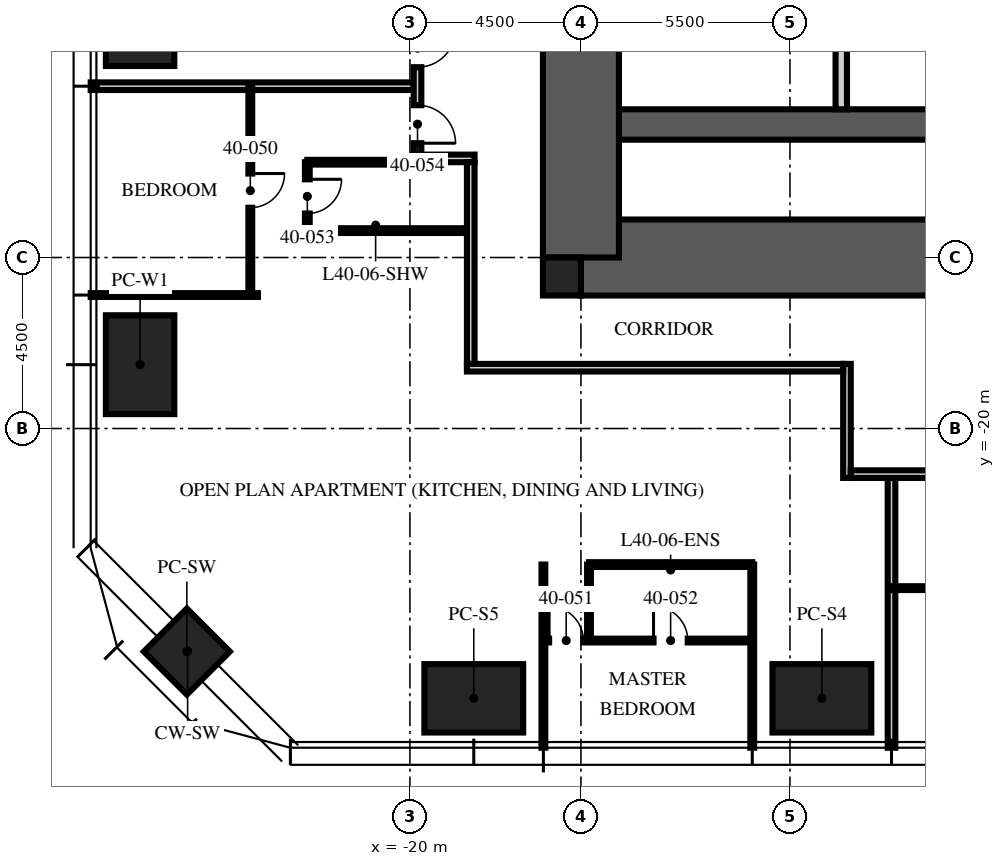
"""IFC4 building model, lengths in metres.
Left out: names, types, materials, properties, quantities, classifications, styles, units other than length and angle.
Written with IfcOpenShell. Run it as: python <this file> out.ifc"""

import sys

from ifc_helpers import new_model, si_unit, direction, frame, frame_2d, origin, origin_2d, place, context, subcontext, project, spatial, rectangle, extrude, element, fill, save


model = new_model("IFC4")
c1 = context("Model", 3, precision=1e-05, world=origin(), true_north=direction((0.0, 1.0)))
c2 = subcontext(c1, "Body", "Model", "MODEL_VIEW")
j1 = project(units=[si_unit("LENGTHUNIT", "METRE"), si_unit("PLANEANGLEUNIT", "RADIAN")], contexts=[c1])
p1 = place(None, origin())
s1 = spatial("IfcSite", under=j1, at=p1, CompositionType="ELEMENT")
p2 = place(p1, origin())
s2 = spatial("IfcBuilding", under=s1, at=p2, CompositionType="ELEMENT")
p3 = place(p2, frame((0.0, 0.0, 159.75)))
s3 = spatial("IfcBuildingStorey", under=s2, at=p3, CompositionType="ELEMENT", Elevation=159.75)
p4 = place(p3, frame((-15.5, -15.5, -0.25), z_axis=(0.0, 0.0, 1.0), x_axis=(1.0, 0.0, 0.0)))
e1 = element("IfcWall", 1, at=p4, inside=s3, PredefinedType="SHEAR", context=c2, shape_type="SweptSolid", body=[
    extrude(rectangle(XDim=31.0, YDim=2.0, at=frame_2d((15.5, 0.0))), origin(), (0.0, 0.0, 1.0), 3.75),
])
p5 = place(p4, frame((10.4, 0.0, 0.25)))
e2 = element("IfcOpeningElement", 2, at=p5, cuts=e1, PredefinedType="OPENING", context=c2, shape_type="SweptSolid", body=[
    extrude(rectangle(XDim=1.1, YDim=2.1, at=frame_2d((0.55, 1.05))), frame((0.0, 1.01, 0.0), z_axis=(0.0, -1.0, 0.0), x_axis=(1.0, 0.0, 0.0)), (0.0, 0.0, 1.0), 2.02),
])
p6 = place(p4, frame((13.5, 0.0, 0.25)))
e3 = element("IfcOpeningElement", 3, at=p6, cuts=e1, PredefinedType="OPENING", context=c2, shape_type="SweptSolid", body=[
    extrude(rectangle(XDim=1.1, YDim=2.1, at=frame_2d((0.55, 1.05))), frame((0.0, 1.01, 0.0), z_axis=(0.0, -1.0, 0.0), x_axis=(1.0, 0.0, 0.0)), (0.0, 0.0, 1.0), 2.02),
])
p7 = place(p4, frame((16.6, 0.0, 0.25)))
e4 = element("IfcOpeningElement", 4, at=p7, cuts=e1, PredefinedType="OPENING", context=c2, shape_type="SweptSolid", body=[
    extrude(rectangle(XDim=1.1, YDim=2.1, at=frame_2d((0.55, 1.05))), frame((0.0, 1.01, 0.0), z_axis=(0.0, -1.0, 0.0), x_axis=(1.0, 0.0, 0.0)), (0.0, 0.0, 1.0), 2.02),
])
p8 = place(p3, frame((-15.5, -12.0, -0.25), z_axis=(0.0, 0.0, 1.0), x_axis=(1.0, 0.0, 0.0)))
e5 = element("IfcWall", 5, at=p8, inside=s3, PredefinedType="SHEAR", context=c2, shape_type="SweptSolid", body=[
    extrude(rectangle(XDim=31.0, YDim=0.8, at=frame_2d((15.5, 0.0))), origin(), (0.0, 0.0, 1.0), 3.75),
])
p9 = place(p3, frame((-15.5, -15.5, -0.25), z_axis=(0.0, 0.0, 1.0), x_axis=(0.0, 1.0, 0.0)))
e6 = element("IfcWall", 6, at=p9, inside=s3, PredefinedType="SHEAR", context=c2, shape_type="SweptSolid", body=[
    extrude(rectangle(XDim=31.0, YDim=2.0, at=frame_2d((15.5, 0.0))), origin(), (0.0, 0.0, 1.0), 3.75),
])
p10 = place(p9, frame((6.5, 0.0, 0.25)))
e7 = element("IfcOpeningElement", 7, at=p10, cuts=e6, PredefinedType="OPENING", context=c2, shape_type="SweptSolid", body=[
    extrude(rectangle(XDim=1.2, YDim=2.1, at=frame_2d((0.6, 1.05))), frame((0.0, 1.01, 0.0), z_axis=(0.0, -1.0, 0.0), x_axis=(1.0, 0.0, 0.0)), (0.0, 0.0, 1.0), 2.02),
])
p11 = place(p9, frame((23.0, 0.0, 0.25)))
e8 = element("IfcOpeningElement", 8, at=p11, cuts=e6, PredefinedType="OPENING", context=c2, shape_type="SweptSolid", body=[
    extrude(rectangle(XDim=1.8, YDim=2.1, at=frame_2d((0.9, 1.05))), frame((0.0, 1.01, 0.0), z_axis=(0.0, -1.0, 0.0), x_axis=(1.0, 0.0, 0.0)), (0.0, 0.0, 1.0), 2.02),
])
p12 = place(p3, frame((-16.0, -16.0, -0.25), z_axis=(0.0, 0.0, 1.0), x_axis=(1.0, 0.0, 0.0)))
e9 = element("IfcColumn", 9, at=p12, inside=s3, PredefinedType="COLUMN", context=c2, shape_type="SweptSolid", body=[
    extrude(rectangle(XDim=1.0, YDim=1.0, at=origin_2d()), origin(), (0.0, 0.0, 1.0), 3.75),
])
for number, where, z_axis, x_axis in (
    (10, (-9.16, -27.1, 0.0), (0.0, 0.0, 1.0), (1.0, 0.0, 0.0)),
    (11, (-18.32, -27.1, 0.0), (0.0, 0.0, 1.0), (1.0, 0.0, 0.0)),
    (12, (-27.1, -18.32, 0.0), (0.0, 0.0, 1.0), (0.0, 1.0, 0.0)),
    (13, (-27.1, -9.16, 0.0), (0.0, 0.0, 1.0), (0.0, 1.0, 0.0)),
):
    element("IfcColumn", number, at=place(p3, frame(where, z_axis=z_axis, x_axis=x_axis)), inside=s3, PredefinedType="COLUMN", context=c2, shape_type="SweptSolid", body=[
        extrude(rectangle(XDim=2.6, YDim=1.8, at=origin_2d()), origin(), (0.0, 0.0, 1.0), 3.75),
    ])
p13 = place(p3, frame((-25.87, -25.87, 0.0), z_axis=(0.0, 0.0, 1.0), x_axis=(0.707106781187, -0.707106781187, 0.0)))
e14 = element("IfcColumn", 14, at=p13, inside=s3, PredefinedType="COLUMN", context=c2, shape_type="SweptSolid", body=[
    extrude(rectangle(XDim=1.6, YDim=1.6, at=origin_2d()), origin(), (0.0, 0.0, 1.0), 3.75),
])
p14 = place(p3, frame((-8.65, -11.6, 0.0), z_axis=(0.0, 0.0, 1.0), x_axis=(0.0, 1.0, 0.0)))
e15 = element("IfcWall", 15, at=p14, inside=s3, PredefinedType="PARTITIONING", context=c2, shape_type="SweptSolid", body=[
    extrude(rectangle(XDim=6.7, YDim=0.3, at=frame_2d((3.35, 0.0))), origin(), (0.0, 0.0, 1.0), 3.5),
])
p15 = place(p14, frame((2.85, 0.0, 0.0)))
e16 = element("IfcOpeningElement", 16, at=p15, cuts=e15, PredefinedType="OPENING", context=c2, shape_type="SweptSolid", body=[
    extrude(rectangle(XDim=1.1, YDim=2.1, at=frame_2d((0.55, 1.05))), frame((0.0, 0.16, 0.0), z_axis=(0.0, -1.0, 0.0), x_axis=(1.0, 0.0, 0.0)), (0.0, 0.0, 1.0), 0.32),
])
p16 = place(p3, frame((-19.9, -10.992, 0.0), z_axis=(0.0, 0.0, 1.0), x_axis=(-1.0, 0.0, 0.0)))
e17 = element("IfcWall", 17, at=p16, inside=s3, PredefinedType="PARTITIONING", context=c2, shape_type="SweptSolid", body=[
    extrude(rectangle(XDim=8.5, YDim=0.2, at=frame_2d((4.25, 0.0))), origin(), (0.0, 0.0, 1.0), 2.81),
])
p17 = place(p3, frame((-24.0, -16.488, 0.0), z_axis=(0.0, 0.0, 1.0), x_axis=(-1.0, 0.0, 0.0)))
e18 = element("IfcWall", 18, at=p17, inside=s3, PredefinedType="PARTITIONING", context=c2, shape_type="SweptSolid", body=[
    extrude(rectangle(XDim=4.4, YDim=0.1, at=frame_2d((2.2, 0.0))), origin(), (0.0, 0.0, 1.0), 2.81),
])
for number, where, z_axis, x_axis in (
    (19, (-16.488, -23.58, 0.0), (0.0, 0.0, 1.0), (0.0, -1.0, 0.0)),
    (20, (-10.992, -23.58, 0.0), (0.0, 0.0, 1.0), (0.0, -1.0, 0.0)),
):
    element("IfcWall", number, at=place(p3, frame(where, z_axis=z_axis, x_axis=x_axis)), inside=s3, PredefinedType="PARTITIONING", context=c2, shape_type="SweptSolid", body=[
        extrude(rectangle(XDim=4.82, YDim=0.1, at=frame_2d((2.41, 0.0))), origin(), (0.0, 0.0, 1.0), 2.81),
    ])
p18 = place(p3, frame((-7.328, -21.3, 0.0), z_axis=(0.0, 0.0, 1.0), x_axis=(0.0, -1.0, 0.0)))
e21 = element("IfcWall", 21, at=p18, inside=s3, PredefinedType="PARTITIONING", context=c2, shape_type="SweptSolid", body=[
    extrude(rectangle(XDim=7.1, YDim=0.2, at=frame_2d((3.55, 0.0))), origin(), (0.0, 0.0, 1.0), 2.81),
])
p19 = place(p3, frame((-24.2, -10.992, 0.0), z_axis=(0.0, 0.0, 1.0), x_axis=(0.0, -1.0, 0.0)))
e22 = element("IfcWall", 22, at=p19, inside=s3, PredefinedType="PARTITIONING", context=c2, shape_type="SweptSolid", body=[
    extrude(rectangle(XDim=5.496, YDim=0.1, at=frame_2d((2.748, 0.0))), origin(), (0.0, 0.0, 1.0), 2.81),
])
p20 = place(p19, frame((2.298, 0.0, 0.0)))
e23 = element("IfcOpeningElement", 23, at=p20, cuts=e22, PredefinedType="OPENING", context=c2, shape_type="SweptSolid", body=[
    extrude(rectangle(XDim=0.9, YDim=2.1, at=frame_2d((0.45, 1.05))), frame((0.0, 0.06, 0.0), z_axis=(0.0, -1.0, 0.0), x_axis=(1.0, 0.0, 0.0)), (0.0, 0.0, 1.0), 0.12),
])
p21 = place(p3, frame((-16.488, -25.58, 0.0), z_axis=(0.0, 0.0, 1.0), x_axis=(1.0, 0.0, 0.0)))
e24 = element("IfcWall", 24, at=p21, inside=s3, PredefinedType="PARTITIONING", context=c2, shape_type="SweptSolid", body=[
    extrude(rectangle(XDim=5.496, YDim=0.1, at=frame_2d((2.748, 0.0))), origin(), (0.0, 0.0, 1.0), 2.81),
])
p22 = place(p21, frame((0.15, 0.0, 0.0)))
e25 = element("IfcOpeningElement", 25, at=p22, cuts=e24, PredefinedType="OPENING", context=c2, shape_type="SweptSolid", body=[
    extrude(rectangle(XDim=0.9, YDim=2.1, at=frame_2d((0.45, 1.05))), frame((0.0, 0.06, 0.0), z_axis=(0.0, -1.0, 0.0), x_axis=(1.0, 0.0, 0.0)), (0.0, 0.0, 1.0), 0.12),
])
p23 = place(p21, frame((2.898, 0.0, 0.0)))
e26 = element("IfcOpeningElement", 26, at=p23, cuts=e24, PredefinedType="OPENING", context=c2, shape_type="SweptSolid", body=[
    extrude(rectangle(XDim=0.9, YDim=2.1, at=frame_2d((0.45, 1.05))), frame((0.0, 0.06, 0.0), z_axis=(0.0, -1.0, 0.0), x_axis=(1.0, 0.0, 0.0)), (0.0, 0.0, 1.0), 0.12),
])
p24 = place(p3, frame((-15.288, -23.58, 0.0), z_axis=(0.0, 0.0, 1.0), x_axis=(0.0, -1.0, 0.0)))
e27 = element("IfcWall", 27, at=p24, inside=s3, PredefinedType="PARTITIONING", context=c2, shape_type="SweptSolid", body=[
    extrude(rectangle(XDim=2.0, YDim=0.1, at=frame_2d((1.0, 0.0))), origin(), (0.0, 0.0, 1.0), 3.5),
])
p25 = place(p3, frame((-15.288, -23.58, 0.0), z_axis=(0.0, 0.0, 1.0), x_axis=(1.0, 0.0, 0.0)))
e28 = element("IfcWall", 28, at=p25, inside=s3, PredefinedType="PARTITIONING", context=c2, shape_type="SweptSolid", body=[
    extrude(rectangle(XDim=4.296, YDim=0.125, at=frame_2d((2.148, 0.0))), origin(), (0.0, 0.0, 1.0), 2.81),
])
p26 = place(p3, frame((-22.7, -12.992, 0.0), z_axis=(0.0, 0.0, 1.0), x_axis=(0.0, -1.0, 0.0)))
e29 = element("IfcWall", 29, at=p26, inside=s3, PredefinedType="PARTITIONING", context=c2, shape_type="SweptSolid", body=[
    extrude(rectangle(XDim=1.8, YDim=0.125, at=frame_2d((0.9, 0.0))), origin(), (0.0, 0.0, 1.0), 2.81),
])
p27 = place(p26, frame((0.45, 0.0, 0.0)))
e30 = element("IfcOpeningElement", 30, at=p27, cuts=e29, PredefinedType="OPENING", context=c2, shape_type="SweptSolid", body=[
    extrude(rectangle(XDim=0.9, YDim=2.1, at=frame_2d((0.45, 1.05))), frame((0.0, 0.073, 0.0), z_axis=(0.0, -1.0, 0.0), x_axis=(1.0, 0.0, 0.0)), (0.0, 0.0, 1.0), 0.145),
])
p28 = place(p3, frame((-19.97, -12.992, 0.0), z_axis=(0.0, 0.0, 1.0), x_axis=(-1.0, 0.0, 0.0)))
e31 = element("IfcWall", 31, at=p28, inside=s3, PredefinedType="PARTITIONING", context=c2, shape_type="SweptSolid", body=[
    extrude(rectangle(XDim=2.73, YDim=0.125, at=frame_2d((1.365, 0.0))), origin(), (0.0, 0.0, 1.0), 3.5),
])
p29 = place(p3, frame((-18.5, -14.792, 0.0), z_axis=(0.0, 0.0, 1.0), x_axis=(-1.0, 0.0, 0.0)))
e32 = element("IfcWall", 32, at=p29, inside=s3, PredefinedType="PARTITIONING", context=c2, shape_type="SweptSolid", body=[
    extrude(rectangle(XDim=4.2, YDim=0.125, at=frame_2d((2.1, 0.0))), origin(), (0.0, 0.0, 1.0), 3.5),
])
p30 = place(p3, frame((-7.328, -24.2, 0.0), z_axis=(0.0, 0.0, 1.0), x_axis=(1.0, 0.0, 0.0)))
e33 = element("IfcWall", 33, at=p30, inside=s3, PredefinedType="PARTITIONING", context=c2, shape_type="SweptSolid", body=[
    extrude(rectangle(XDim=5.496, YDim=0.1, at=frame_2d((2.748, 0.0))), origin(), (0.0, 0.0, 1.0), 2.81),
])
p31 = place(p30, frame((2.298, 0.0, 0.0)))
e34 = element("IfcOpeningElement", 34, at=p31, cuts=e33, PredefinedType="OPENING", context=c2, shape_type="SweptSolid", body=[
    extrude(rectangle(XDim=0.9, YDim=2.1, at=frame_2d((0.45, 1.05))), frame((0.0, 0.06, 0.0), z_axis=(0.0, -1.0, 0.0), x_axis=(1.0, 0.0, 0.0)), (0.0, 0.0, 1.0), 0.12),
])
p32 = place(p3, frame((-18.3, -12.892, 0.0), z_axis=(0.0, 0.0, 1.0), x_axis=(-1.0, 0.0, 0.0)))
e35 = element("IfcWall", 35, at=p32, inside=s3, PredefinedType="PARTITIONING", context=c2, shape_type="SweptSolid", body=[
    extrude(rectangle(XDim=1.6, YDim=0.2, at=frame_2d((0.8, 0.0))), origin(), (0.0, 0.0, 1.0), 3.5),
])
p33 = place(p3, frame((-19.8, -9.192, 0.0), z_axis=(0.0, 0.0, 1.0), x_axis=(0.0, -1.0, 0.0)))
e36 = element("IfcWall", 36, at=p33, inside=s3, PredefinedType="PARTITIONING", context=c2, shape_type="SweptSolid", body=[
    extrude(rectangle(XDim=3.6, YDim=0.2, at=frame_2d((1.8, 0.0))), origin(), (0.0, 0.0, 1.0), 2.7),
])
p34 = place(p33, frame((0.3, 0.0, 0.0)))
e37 = element("IfcOpeningElement", 37, at=p34, cuts=e36, PredefinedType="OPENING", context=c2, shape_type="SweptSolid", body=[
    extrude(rectangle(XDim=1.0, YDim=2.2, at=frame_2d((0.5, 1.1))), frame((0.0, 0.11, 0.0), z_axis=(0.0, -1.0, 0.0), x_axis=(1.0, 0.0, 0.0)), (0.0, 0.0, 1.0), 0.22),
])
p35 = place(p33, frame((2.3, 0.0, 0.0)))
e38 = element("IfcOpeningElement", 38, at=p35, cuts=e36, PredefinedType="OPENING", context=c2, shape_type="SweptSolid", body=[
    extrude(rectangle(XDim=1.0, YDim=2.2, at=frame_2d((0.5, 1.1))), frame((0.0, 0.11, 0.0), z_axis=(0.0, -1.0, 0.0), x_axis=(1.0, 0.0, 0.0)), (0.0, 0.0, 1.0), 0.22),
])
p36 = place(p3, frame((-18.4, -12.992, 0.0), z_axis=(0.0, 0.0, 1.0), x_axis=(0.0, -1.0, 0.0)))
e39 = element("IfcWall", 39, at=p36, inside=s3, PredefinedType="PARTITIONING", context=c2, shape_type="SweptSolid", body=[
    extrude(rectangle(XDim=5.308, YDim=0.2, at=frame_2d((2.654, 0.0))), origin(), (0.0, 0.0, 1.0), 2.3),
])
p37 = place(p3, frame((-8.5, -18.3, 0.0), z_axis=(0.0, 0.0, 1.0), x_axis=(0.0, -1.0, 0.0)))
e40 = element("IfcWall", 40, at=p37, inside=s3, PredefinedType="PARTITIONING", context=c2, shape_type="SweptSolid", body=[
    extrude(rectangle(XDim=3.0, YDim=0.2, at=frame_2d((1.5, 0.0))), origin(), (0.0, 0.0, 1.0), 3.5),
])
p38 = place(p3, frame((5.4, -21.2, 0.0), z_axis=(0.0, 0.0, 1.0), x_axis=(-1.0, 0.0, 0.0)))
e41 = element("IfcWall", 41, at=p38, inside=s3, PredefinedType="PARTITIONING", context=c2, shape_type="SweptSolid", body=[
    extrude(rectangle(XDim=13.8, YDim=0.2, at=frame_2d((6.9, 0.0))), origin(), (0.0, 0.0, 1.0), 2.7),
])
p39 = place(p38, frame((0.958, 0.0, 0.0)))
e42 = element("IfcOpeningElement", 42, at=p39, cuts=e41, PredefinedType="OPENING", context=c2, shape_type="SweptSolid", body=[
    extrude(rectangle(XDim=1.0, YDim=2.2, at=frame_2d((0.5, 1.1))), frame((0.0, 0.11, 0.0), z_axis=(0.0, -1.0, 0.0), x_axis=(1.0, 0.0, 0.0)), (0.0, 0.0, 1.0), 0.22),
])
p40 = place(p3, frame((-8.6, -18.4, 0.0), z_axis=(0.0, 0.0, 1.0), x_axis=(-1.0, 0.0, 0.0)))
e43 = element("IfcWall", 43, at=p40, inside=s3, PredefinedType="PARTITIONING", context=c2, shape_type="SweptSolid", body=[
    extrude(rectangle(XDim=9.9, YDim=0.2, at=frame_2d((4.95, 0.0))), origin(), (0.0, 0.0, 1.0), 2.3),
])
p41 = place(p34, origin())
e44 = element("IfcDoor", 44, at=p41, inside=s3, OperationType="SINGLE_SWING_LEFT", PredefinedType="DOOR", context=c2, shape_type="SweptSolid", body=[
    extrude(rectangle(XDim=1.0, YDim=2.2, at=frame_2d((0.5, 1.1))), frame((0.0, 0.025, 0.0), z_axis=(0.0, -1.0, 0.0), x_axis=(1.0, 0.0, 0.0)), (0.0, 0.0, 1.0), 0.05),
])
fill(e37, e44)
p42 = place(p20, origin())
e45 = element("IfcDoor", 45, at=p42, inside=s3, OperationType="SINGLE_SWING_LEFT", PredefinedType="DOOR", context=c2, shape_type="SweptSolid", body=[
    extrude(rectangle(XDim=0.9, YDim=2.1, at=frame_2d((0.45, 1.05))), frame((0.0, 0.025, 0.0), z_axis=(0.0, -1.0, 0.0), x_axis=(1.0, 0.0, 0.0)), (0.0, 0.0, 1.0), 0.05),
])
fill(e23, e45)
p43 = place(p22, origin())
e46 = element("IfcDoor", 46, at=p43, inside=s3, OperationType="SINGLE_SWING_LEFT", PredefinedType="DOOR", context=c2, shape_type="SweptSolid", body=[
    extrude(rectangle(XDim=0.9, YDim=2.1, at=frame_2d((0.45, 1.05))), frame((0.0, 0.025, 0.0), z_axis=(0.0, -1.0, 0.0), x_axis=(1.0, 0.0, 0.0)), (0.0, 0.0, 1.0), 0.05),
])
fill(e25, e46)
p44 = place(p23, origin())
e47 = element("IfcDoor", 47, at=p44, inside=s3, OperationType="SINGLE_SWING_LEFT", PredefinedType="DOOR", context=c2, shape_type="SweptSolid", body=[
    extrude(rectangle(XDim=0.9, YDim=2.1, at=frame_2d((0.45, 1.05))), frame((0.0, 0.025, 0.0), z_axis=(0.0, -1.0, 0.0), x_axis=(1.0, 0.0, 0.0)), (0.0, 0.0, 1.0), 0.05),
])
fill(e26, e47)
p45 = place(p27, origin())
e48 = element("IfcDoor", 48, at=p45, inside=s3, OperationType="SINGLE_SWING_LEFT", PredefinedType="DOOR", context=c2, shape_type="SweptSolid", body=[
    extrude(rectangle(XDim=0.9, YDim=2.1, at=frame_2d((0.45, 1.05))), frame((0.0, 0.025, 0.0), z_axis=(0.0, -1.0, 0.0), x_axis=(1.0, 0.0, 0.0)), (0.0, 0.0, 1.0), 0.05),
])
fill(e30, e48)
p46 = place(p35, origin())
e49 = element("IfcDoor", 49, at=p46, inside=s3, OperationType="SINGLE_SWING_RIGHT", PredefinedType="DOOR", context=c2, shape_type="SweptSolid", body=[
    extrude(rectangle(XDim=1.0, YDim=2.2, at=frame_2d((0.5, 1.1))), frame((0.0, 0.025, 0.0), z_axis=(0.0, -1.0, 0.0), x_axis=(1.0, 0.0, 0.0)), (0.0, 0.0, 1.0), 0.05),
])
fill(e38, e49)
save(model, sys.argv[1])
